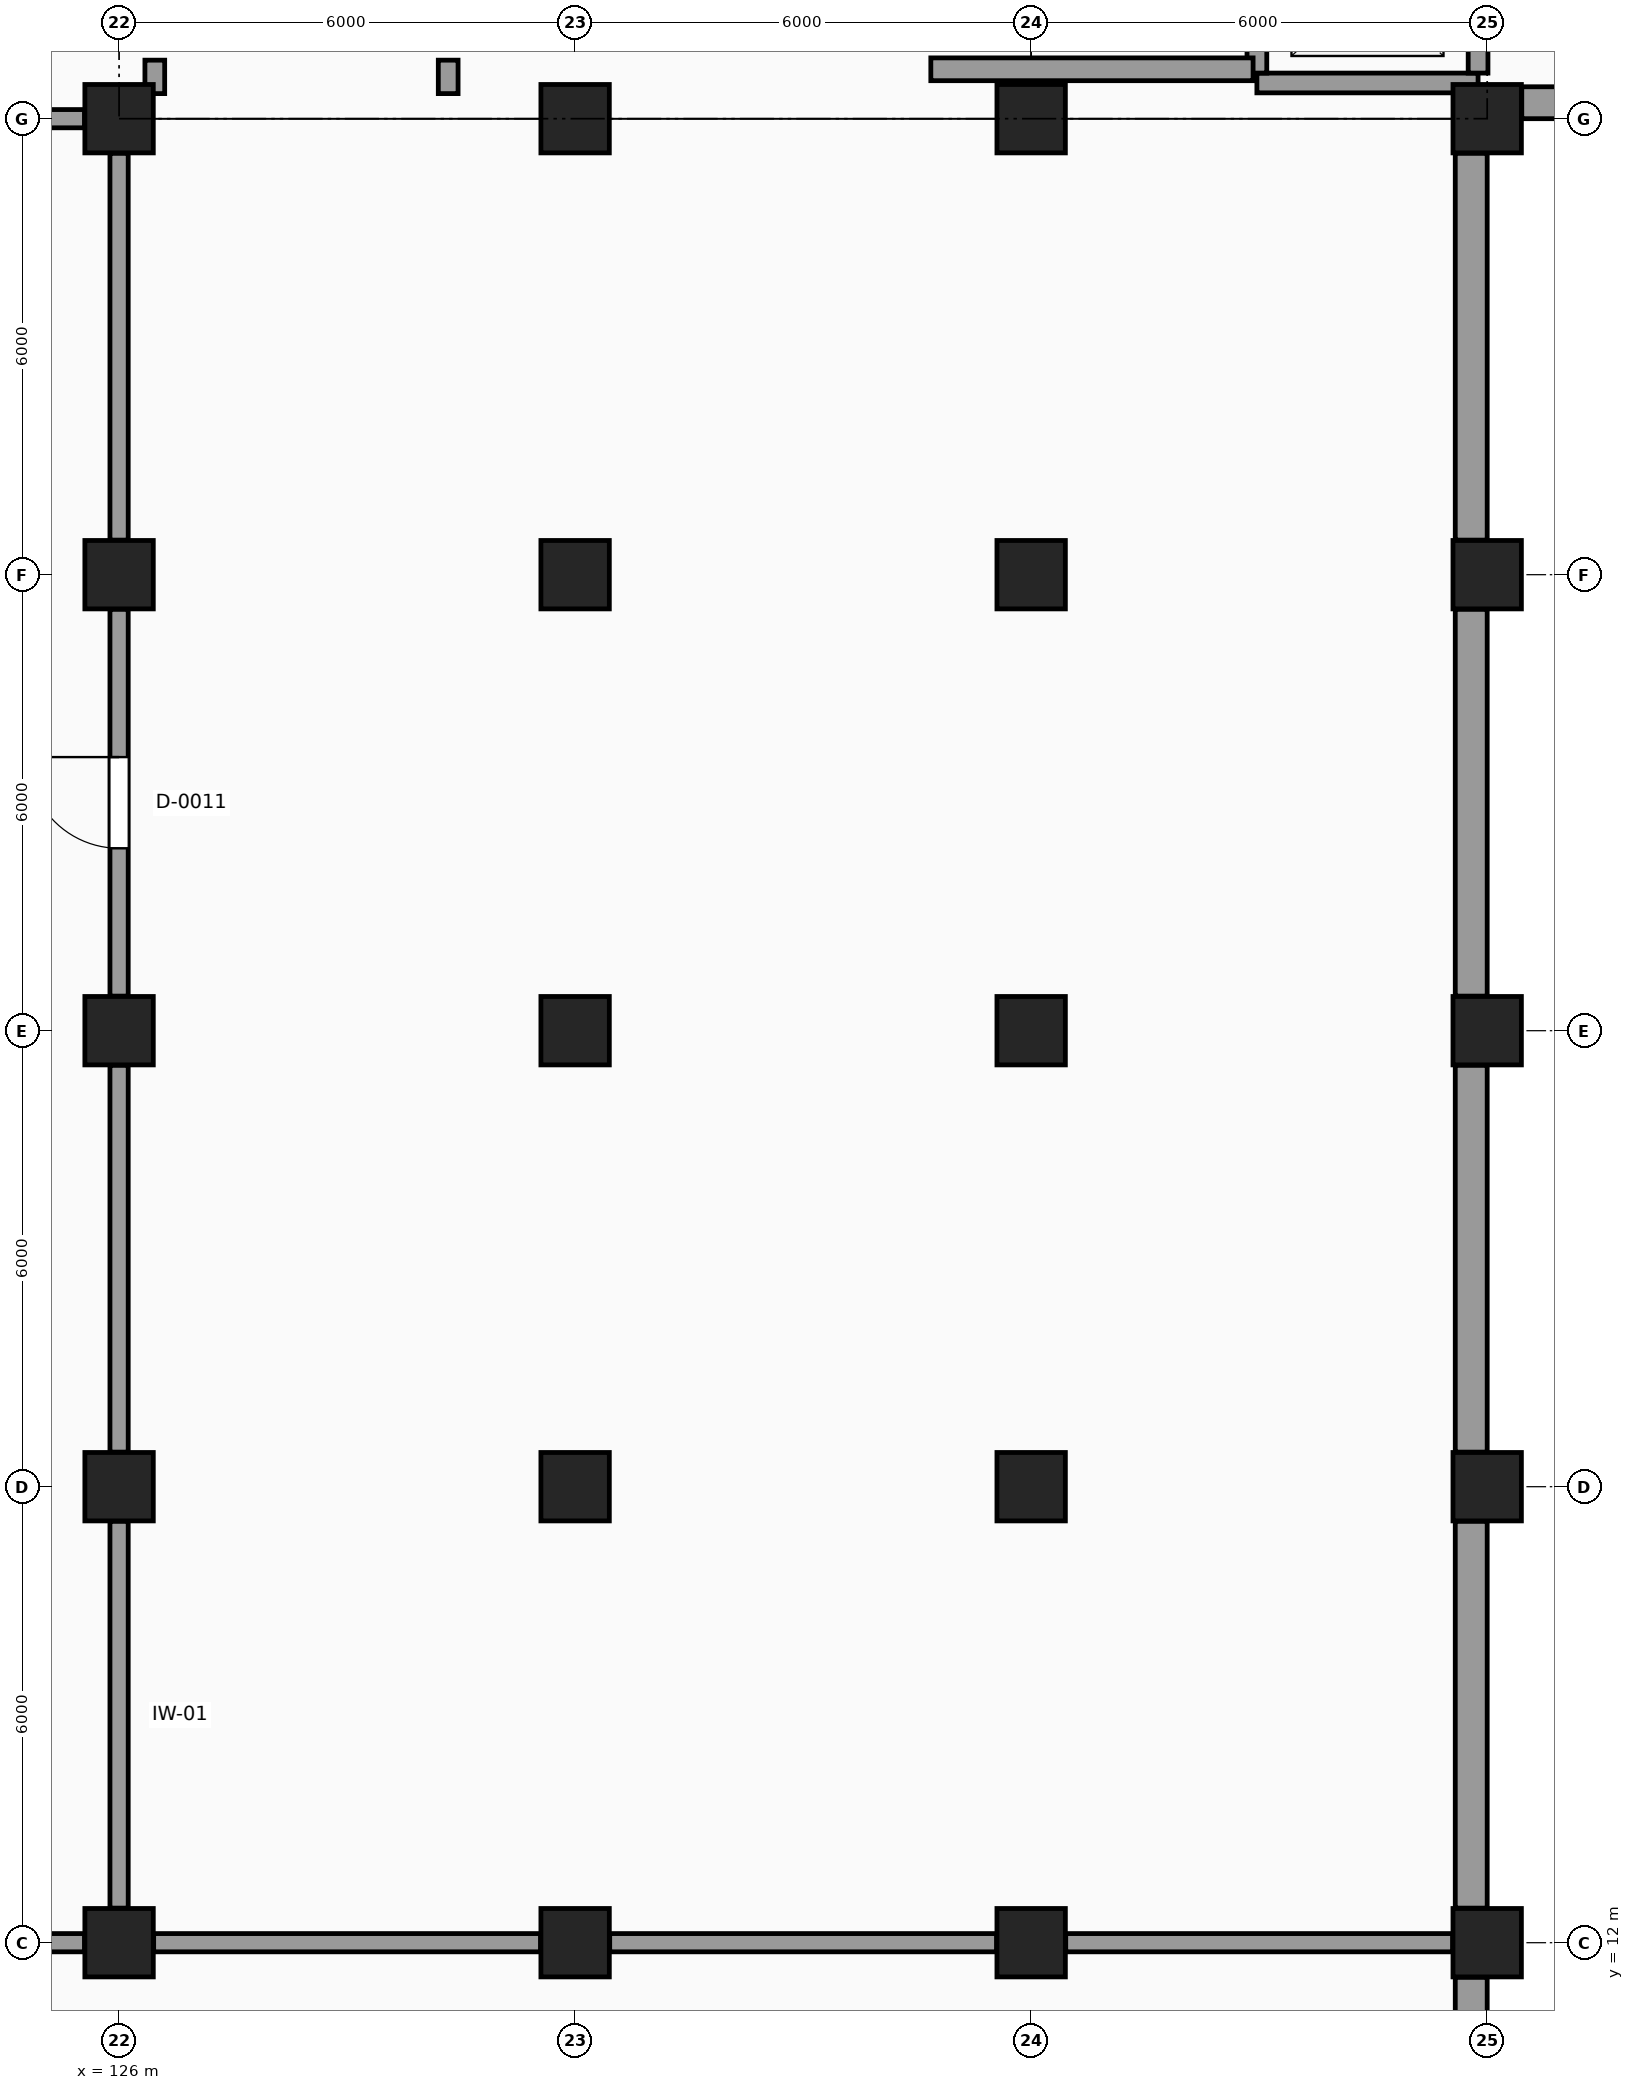
"""IFC4 building model, lengths in metres.
Left out: names, types, materials, properties, quantities, classifications, styles, units other than length and angle.
Written with IfcOpenShell. Run it as: python <this file> out.ifc"""

import sys

from ifc_helpers import new_model, si_unit, direction, frame, frame_2d, origin, origin_2d, place, context, subcontext, project, spatial, rectangle, extrude, element, fill, save


model = new_model("IFC4")
c1 = context("Model", 3, precision=1e-05, world=origin(), true_north=direction((0.0, 1.0)))
c2 = subcontext(c1, "Body", "Model", "MODEL_VIEW")
j1 = project(units=[si_unit("LENGTHUNIT", "METRE"), si_unit("PLANEANGLEUNIT", "RADIAN")], contexts=[c1])
p1 = place(None, origin())
s1 = spatial("IfcSite", under=j1, at=p1, CompositionType="ELEMENT")
p2 = place(p1, origin())
s2 = spatial("IfcBuilding", under=s1, at=p2, CompositionType="ELEMENT")
p3 = place(p2, frame((0.0, 0.0, -4.8)))
s3 = spatial("IfcBuildingStorey", under=s2, at=p3, CompositionType="ELEMENT", Elevation=-4.8)
for number, where, z_axis, x_axis in (
    (1, (126.0, 12.0, 0.0), (0.0, 0.0, 1.0), (1.0, 0.0, 0.0)),
    (2, (126.0, 18.0, 0.0), (0.0, 0.0, 1.0), (1.0, 0.0, 0.0)),
    (3, (126.0, 24.0, 0.0), (0.0, 0.0, 1.0), (1.0, 0.0, 0.0)),
    (4, (126.0, 30.0, 0.0), (0.0, 0.0, 1.0), (1.0, 0.0, 0.0)),
    (5, (126.0, 36.0, 0.0), (0.0, 0.0, 1.0), (1.0, 0.0, 0.0)),
    (6, (132.0, 12.0, 0.0), (0.0, 0.0, 1.0), (1.0, 0.0, 0.0)),
    (7, (132.0, 18.0, 0.0), (0.0, 0.0, 1.0), (1.0, 0.0, 0.0)),
    (8, (132.0, 24.0, 0.0), (0.0, 0.0, 1.0), (1.0, 0.0, 0.0)),
    (9, (132.0, 30.0, 0.0), (0.0, 0.0, 1.0), (1.0, 0.0, 0.0)),
    (10, (132.0, 36.0, 0.0), (0.0, 0.0, 1.0), (1.0, 0.0, 0.0)),
    (11, (138.0, 12.0, 0.0), (0.0, 0.0, 1.0), (1.0, 0.0, 0.0)),
    (12, (138.0, 18.0, 0.0), (0.0, 0.0, 1.0), (1.0, 0.0, 0.0)),
    (13, (138.0, 24.0, 0.0), (0.0, 0.0, 1.0), (1.0, 0.0, 0.0)),
    (14, (138.0, 30.0, 0.0), (0.0, 0.0, 1.0), (1.0, 0.0, 0.0)),
    (15, (138.0, 36.0, 0.0), (0.0, 0.0, 1.0), (1.0, 0.0, 0.0)),
    (16, (144.0, 12.0, 0.0), (0.0, 0.0, 1.0), (1.0, 0.0, 0.0)),
    (17, (144.0, 18.0, 0.0), (0.0, 0.0, 1.0), (1.0, 0.0, 0.0)),
    (18, (144.0, 24.0, 0.0), (0.0, 0.0, 1.0), (1.0, 0.0, 0.0)),
    (19, (144.0, 30.0, 0.0), (0.0, 0.0, 1.0), (1.0, 0.0, 0.0)),
    (20, (144.0, 36.0, 0.0), (0.0, 0.0, 1.0), (1.0, 0.0, 0.0)),
):
    element("IfcColumn", number, at=place(p3, frame(where, z_axis=z_axis, x_axis=x_axis)), inside=s3, PredefinedType="COLUMN", context=c2, shape_type="SweptSolid", body=[
        extrude(rectangle(XDim=0.9, YDim=0.9, at=origin_2d()), origin(), (0.0, 0.0, 1.0), 4.8),
    ])
for number, where, z_axis, x_axis in (
    (21, (143.79, 6.455, 0.0), (0.0, 0.0, 1.0), (0.0, 1.0, 0.0)),
    (22, (143.79, 12.455, 0.0), (0.0, 0.0, 1.0), (0.0, 1.0, 0.0)),
    (23, (143.79, 18.455, 0.0), (0.0, 0.0, 1.0), (0.0, 1.0, 0.0)),
    (24, (143.79, 24.455, 0.0), (0.0, 0.0, 1.0), (0.0, 1.0, 0.0)),
    (25, (143.79, 30.455, 0.0), (0.0, 0.0, 1.0), (0.0, 1.0, 0.0)),
):
    element("IfcWall", number, at=place(p3, frame(where, z_axis=z_axis, x_axis=x_axis)), inside=s3, PredefinedType="SOLIDWALL", context=c2, shape_type="SweptSolid", body=[
        extrude(rectangle(XDim=5.09, YDim=0.42, at=frame_2d((2.545, 0.0))), origin(), (0.0, 0.0, 1.0), 3.75),
    ])
p4 = place(p3, frame((144.455, 36.21, 0.0), z_axis=(0.0, 0.0, 1.0), x_axis=(1.0, 0.0, 0.0)))
e26 = element("IfcWall", 26, at=p4, inside=s3, PredefinedType="SOLIDWALL", context=c2, shape_type="SweptSolid", body=[
    extrude(rectangle(XDim=11.09, YDim=0.42, at=frame_2d((5.545, 0.0))), origin(), (0.0, 0.0, 1.0), 4.5),
])
p5 = place(p3, frame((140.97, 36.47, -0.5), z_axis=(0.0, 0.0, 1.0), x_axis=(1.0, 0.0, 0.0)))
e27 = element("IfcWall", 27, at=p5, inside=s3, PredefinedType="SHEAR", context=c2, shape_type="SweptSolid", body=[
    extrude(rectangle(XDim=2.91, YDim=0.26, at=frame_2d((1.455, 0.0))), origin(), (0.0, 0.0, 1.0), 5.3),
])
p6 = place(p3, frame((143.88, 36.6, -0.5), z_axis=(0.0, 0.0, 1.0), x_axis=(0.0, 1.0, 0.0)))
e28 = element("IfcWall", 28, at=p6, inside=s3, PredefinedType="SHEAR", context=c2, shape_type="SweptSolid", body=[
    extrude(rectangle(XDim=2.25, YDim=0.26, at=frame_2d((1.125, 0.0))), origin(), (0.0, 0.0, 1.0), 5.3),
])
p7 = place(p3, frame((140.97, 36.6, -0.5), z_axis=(0.0, 0.0, 1.0), x_axis=(0.0, 1.0, 0.0)))
e29 = element("IfcWall", 29, at=p7, inside=s3, PredefinedType="SHEAR", context=c2, shape_type="SweptSolid", body=[
    extrude(rectangle(XDim=2.25, YDim=0.26, at=frame_2d((1.125, 0.0))), origin(), (0.0, 0.0, 1.0), 5.3),
])
p8 = place(p7, frame((0.575, 0.0, 0.5)))
e30 = element("IfcOpeningElement", 30, at=p8, cuts=e29, PredefinedType="OPENING", context=c2, shape_type="SweptSolid", body=[
    extrude(rectangle(XDim=1.1, YDim=2.2, at=frame_2d((0.55, 1.1))), frame((0.0, 0.14, 0.0), z_axis=(0.0, -1.0, 0.0), x_axis=(1.0, 0.0, 0.0)), (0.0, 0.0, 1.0), 0.28),
])
for number, where, z_axis, x_axis in (
    (31, (126.47, 36.33, -0.5), (0.0, 0.0, 1.0), (0.0, 1.0, 0.0)),
    (32, (130.33, 36.33, -0.5), (0.0, 0.0, 1.0), (0.0, 1.0, 0.0)),
):
    element("IfcWall", number, at=place(p3, frame(where, z_axis=z_axis, x_axis=x_axis)), inside=s3, PredefinedType="SHEAR", context=c2, shape_type="SweptSolid", body=[
        extrude(rectangle(XDim=0.44, YDim=0.26, at=frame_2d((0.22, 0.0))), origin(), (0.0, 0.0, 1.0), 5.3),
    ])
p9 = place(p3, frame((136.68, 36.65, -0.5), z_axis=(0.0, 0.0, 1.0), x_axis=(1.0, 0.0, 0.0)))
e33 = element("IfcWall", 33, at=p9, inside=s3, PredefinedType="SHEAR", context=c2, shape_type="SweptSolid", body=[
    extrude(rectangle(XDim=4.24, YDim=0.3, at=frame_2d((2.12, 0.0))), origin(), (0.0, 0.0, 1.0), 5.3),
])
p10 = place(p3, frame((126.0, 12.455, 0.0), z_axis=(0.0, 0.0, 1.0), x_axis=(0.0, 1.0, 0.0)))
e34 = element("IfcWall", 34, at=p10, inside=s3, PredefinedType="PARTITIONING", context=c2, shape_type="SweptSolid", body=[
    extrude(rectangle(XDim=5.09, YDim=0.24, at=frame_2d((2.545, 0.0))), origin(), (0.0, 0.0, 1.0), 3.95),
])
p11 = place(p3, frame((126.0, 18.455, 0.0), z_axis=(0.0, 0.0, 1.0), x_axis=(0.0, 1.0, 0.0)))
e35 = element("IfcWall", 35, at=p11, inside=s3, PredefinedType="PARTITIONING", context=c2, shape_type="SweptSolid", body=[
    extrude(rectangle(XDim=5.09, YDim=0.24, at=frame_2d((2.545, 0.0))), origin(), (0.0, 0.0, 1.0), 4.0),
])
p12 = place(p3, frame((126.0, 24.455, 0.0), z_axis=(0.0, 0.0, 1.0), x_axis=(0.0, 1.0, 0.0)))
e36 = element("IfcWall", 36, at=p12, inside=s3, PredefinedType="PARTITIONING", context=c2, shape_type="SweptSolid", body=[
    extrude(rectangle(XDim=5.09, YDim=0.24, at=frame_2d((2.545, 0.0))), origin(), (0.0, 0.0, 1.0), 4.16),
])
p13 = place(p12, frame((1.945, 0.0, 0.0)))
e37 = element("IfcOpeningElement", 37, at=p13, cuts=e36, PredefinedType="OPENING", context=c2, shape_type="SweptSolid", body=[
    extrude(rectangle(XDim=1.2, YDim=2.2, at=frame_2d((0.6, 1.1))), frame((0.0, 0.13, 0.0), z_axis=(0.0, -1.0, 0.0), x_axis=(1.0, 0.0, 0.0)), (0.0, 0.0, 1.0), 0.26),
])
for number, where, z_axis, x_axis in (
    (38, (126.0, 30.455, 0.0), (0.0, 0.0, 1.0), (0.0, 1.0, 0.0)),
    (39, (120.455, 12.0, 0.0), (0.0, 0.0, 1.0), (1.0, 0.0, 0.0)),
):
    element("IfcWall", number, at=place(p3, frame(where, z_axis=z_axis, x_axis=x_axis)), inside=s3, PredefinedType="PARTITIONING", context=c2, shape_type="SweptSolid", body=[
        extrude(rectangle(XDim=5.09, YDim=0.24, at=frame_2d((2.545, 0.0))), origin(), (0.0, 0.0, 1.0), 3.7),
    ])
p14 = place(p3, frame((126.455, 12.0, 0.0), z_axis=(0.0, 0.0, 1.0), x_axis=(1.0, 0.0, 0.0)))
e40 = element("IfcWall", 40, at=p14, inside=s3, PredefinedType="PARTITIONING", context=c2, shape_type="SweptSolid", body=[
    extrude(rectangle(XDim=5.09, YDim=0.24, at=frame_2d((2.545, 0.0))), origin(), (0.0, 0.0, 1.0), 3.8),
])
p15 = place(p3, frame((132.455, 12.0, 0.0), z_axis=(0.0, 0.0, 1.0), x_axis=(1.0, 0.0, 0.0)))
e41 = element("IfcWall", 41, at=p15, inside=s3, PredefinedType="PARTITIONING", context=c2, shape_type="SweptSolid", body=[
    extrude(rectangle(XDim=5.09, YDim=0.24, at=frame_2d((2.545, 0.0))), origin(), (0.0, 0.0, 1.0), 3.9),
])
p16 = place(p3, frame((138.455, 12.0, 0.0), z_axis=(0.0, 0.0, 1.0), x_axis=(1.0, 0.0, 0.0)))
e42 = element("IfcWall", 42, at=p16, inside=s3, PredefinedType="PARTITIONING", context=c2, shape_type="SweptSolid", body=[
    extrude(rectangle(XDim=5.09, YDim=0.24, at=frame_2d((2.545, 0.0))), origin(), (0.0, 0.0, 1.0), 4.05),
])
p17 = place(p3, frame((120.455, 36.0, 0.0), z_axis=(0.0, 0.0, 1.0), x_axis=(1.0, 0.0, 0.0)))
e43 = element("IfcWall", 43, at=p17, inside=s3, PredefinedType="PARTITIONING", context=c2, shape_type="SweptSolid", body=[
    extrude(rectangle(XDim=5.09, YDim=0.24, at=frame_2d((2.545, 0.0))), origin(), (0.0, 0.0, 1.0), 3.7),
])
p18 = place(p13, origin())
e44 = element("IfcDoor", 44, at=p18, inside=s3, OperationType="SINGLE_SWING_RIGHT", PredefinedType="DOOR", context=c2, shape_type="SweptSolid", body=[
    extrude(rectangle(XDim=1.2, YDim=2.2, at=frame_2d((0.6, 1.1))), frame((0.0, 0.025, 0.0), z_axis=(0.0, -1.0, 0.0), x_axis=(1.0, 0.0, 0.0)), (0.0, 0.0, 1.0), 0.05),
])
fill(e37, e44)
save(model, sys.argv[1])
